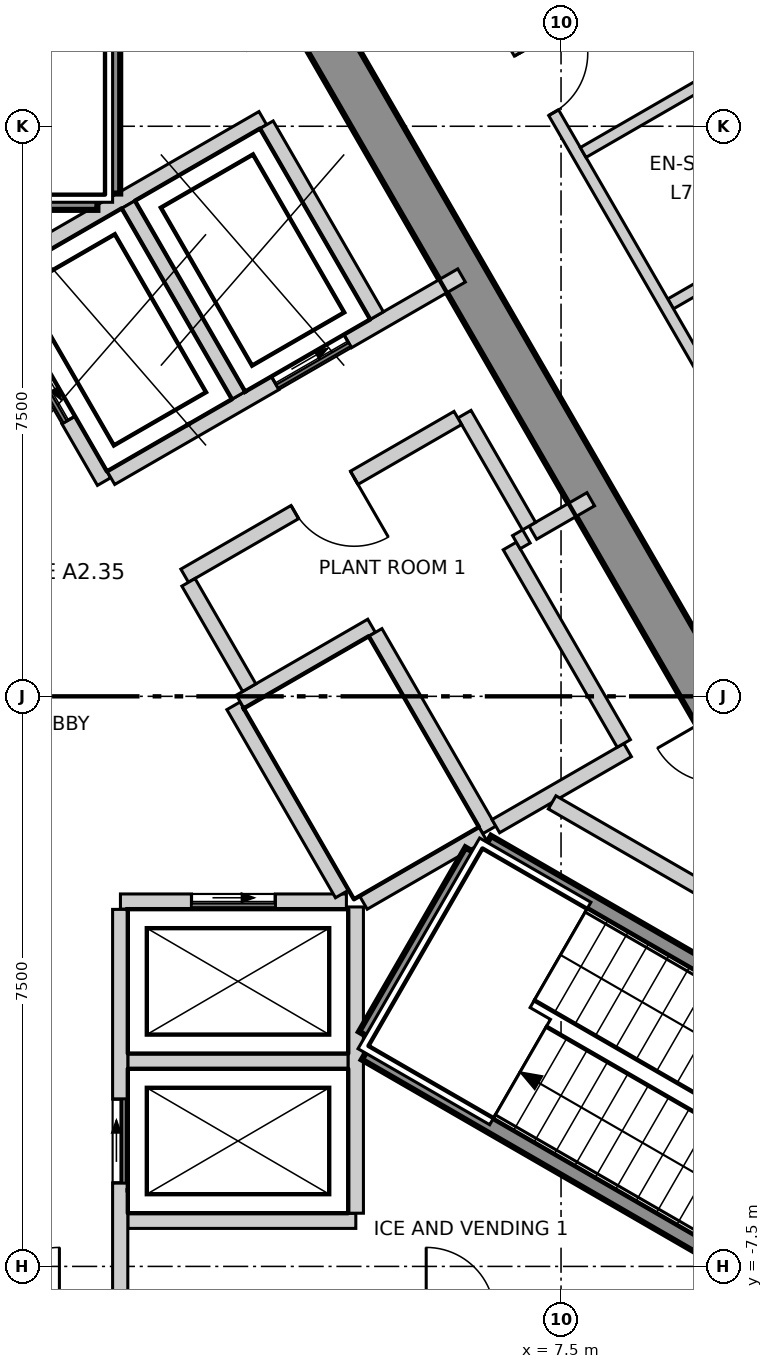
"""IFC4 building model, lengths in metres.
Left out: names, types, materials, properties, quantities, classifications, styles, units other than length and angle.
Written with IfcOpenShell. Run it as: python <this file> out.ifc"""

import sys

from ifc_helpers import new_model, si_unit, direction, frame, frame_2d, origin, place, context, subcontext, project, spatial, polyline, rectangle, outline, extrude, element, fill, save


model = new_model("IFC4")
c1 = context("Model", 3, precision=1e-05, world=origin(), true_north=direction((0.0, 1.0)))
c2 = subcontext(c1, "Body", "Model", "MODEL_VIEW")
j1 = project(units=[si_unit("LENGTHUNIT", "METRE"), si_unit("PLANEANGLEUNIT", "RADIAN")], contexts=[c1])
p1 = place(None, origin())
s1 = spatial("IfcSite", under=j1, at=p1, CompositionType="ELEMENT")
p2 = place(p1, origin())
s2 = spatial("IfcBuilding", under=s1, at=p2, CompositionType="ELEMENT")
p3 = place(p2, frame((0.0, 0.0, 300.7)))
s3 = spatial("IfcBuildingStorey", under=s2, at=p3, CompositionType="ELEMENT", Elevation=300.7)
p4 = place(p3, frame((12.384, -5.15, -0.3), z_axis=(0.0, 0.0, 1.0), x_axis=(-0.500000539815, 0.866025092122, 0.0)))
e1 = element("IfcWall", 1, at=p4, inside=s3, PredefinedType="SHEAR", context=c2, shape_type="SweptSolid", body=[
    extrude(outline(polyline([(-0.173, -0.301), (1.795, -0.301), (3.763, -0.301), (5.731, -0.301), (7.7, -0.301), (9.668, -0.301), (11.636, -0.301), (13.604, -0.3), (15.573, -0.3), (17.541, -0.3), (19.509, -0.3), (21.477, -0.3), (21.131, 0.3), (19.226, 0.3), (17.321, 0.3), (15.415, 0.3), (13.51, 0.3), (11.605, 0.3), (9.699, 0.3), (7.794, 0.3), (5.889, 0.3), (3.984, 0.3), (2.078, 0.3), (0.173, 0.3), (-0.173, -0.301)])), origin(), (0.0, 0.0, 1.0), 3.6),
])
p5 = place(p4, frame((16.328, 0.0, 0.3)))
e2 = element("IfcOpeningElement", 2, at=p5, cuts=e1, PredefinedType="OPENING", context=c2, shape_type="SweptSolid", body=[
    extrude(rectangle(XDim=1.0, YDim=2.1, at=frame_2d((0.5, 1.05))), frame((0.0, 0.31, 0.0), z_axis=(0.0, -1.0, 0.0), x_axis=(1.0, 0.0, 0.0)), (0.0, 0.0, 1.0), 0.621),
])
p6 = place(p4, frame((4.777, 0.0, 0.3)))
e3 = element("IfcOpeningElement", 3, at=p6, cuts=e1, PredefinedType="OPENING", context=c2, shape_type="SweptSolid", body=[
    extrude(rectangle(XDim=0.9, YDim=2.1, at=frame_2d((0.45, 1.05))), frame((0.0, 0.31, 0.0), z_axis=(0.0, -1.0, 0.0), x_axis=(1.0, 0.0, 0.0)), (0.0, 0.0, 1.0), 0.621),
])
p7 = place(p3, frame((24.96, -11.578, 0.0), z_axis=(0.0, 0.0, 1.0), x_axis=(-0.500002391419, 0.866024023094, 0.0)))
e4 = element("IfcWall", 4, at=p7, inside=s3, PredefinedType="ELEMENTEDWALL", context=c2, shape_type="SweptSolid", body=[
    extrude(rectangle(XDim=44.994, YDim=0.2, at=frame_2d((22.497, 0.0))), origin(), (0.0, 0.0, 1.0), 3.3),
])
p8 = place(p7, frame((2.103, 0.0, 0.9)))
e5 = element("IfcOpeningElement", 5, at=p8, cuts=e4, PredefinedType="OPENING", context=c2, shape_type="SweptSolid", body=[
    extrude(rectangle(XDim=3.7, YDim=2.2, at=frame_2d((1.85, 1.1))), frame((0.0, 0.11, 0.0), z_axis=(0.0, -1.0, 0.0), x_axis=(1.0, 0.0, 0.0)), (0.0, 0.0, 1.0), 0.22),
])
p9 = place(p7, frame((7.404, 0.0, 0.9)))
e6 = element("IfcOpeningElement", 6, at=p9, cuts=e4, PredefinedType="OPENING", context=c2, shape_type="SweptSolid", body=[
    extrude(rectangle(XDim=3.7, YDim=2.2, at=frame_2d((1.85, 1.1))), frame((0.0, 0.11, 0.0), z_axis=(0.0, -1.0, 0.0), x_axis=(1.0, 0.0, 0.0)), (0.0, 0.0, 1.0), 0.22),
])
p10 = place(p7, frame((12.705, 0.0, 0.9)))
e7 = element("IfcOpeningElement", 7, at=p10, cuts=e4, PredefinedType="OPENING", context=c2, shape_type="SweptSolid", body=[
    extrude(rectangle(XDim=3.7, YDim=2.2, at=frame_2d((1.85, 1.1))), frame((0.0, 0.11, 0.0), z_axis=(0.0, -1.0, 0.0), x_axis=(1.0, 0.0, 0.0)), (0.0, 0.0, 1.0), 0.22),
])
p11 = place(p7, frame((18.006, 0.0, 0.9)))
e8 = element("IfcOpeningElement", 8, at=p11, cuts=e4, PredefinedType="OPENING", context=c2, shape_type="SweptSolid", body=[
    extrude(rectangle(XDim=3.7, YDim=2.2, at=frame_2d((1.85, 1.1))), frame((0.0, 0.11, 0.0), z_axis=(0.0, -1.0, 0.0), x_axis=(1.0, 0.0, 0.0)), (0.0, 0.0, 1.0), 0.22),
])
p12 = place(p7, frame((23.308, 0.0, 0.9)))
e9 = element("IfcOpeningElement", 9, at=p12, cuts=e4, PredefinedType="OPENING", context=c2, shape_type="SweptSolid", body=[
    extrude(rectangle(XDim=3.7, YDim=2.2, at=frame_2d((1.85, 1.1))), frame((0.0, 0.11, 0.0), z_axis=(0.0, -1.0, 0.0), x_axis=(1.0, 0.0, 0.0)), (0.0, 0.0, 1.0), 0.22),
])
p13 = place(p7, frame((28.609, 0.0, 0.9)))
e10 = element("IfcOpeningElement", 10, at=p13, cuts=e4, PredefinedType="OPENING", context=c2, shape_type="SweptSolid", body=[
    extrude(rectangle(XDim=3.7, YDim=2.2, at=frame_2d((1.85, 1.1))), frame((0.0, 0.11, 0.0), z_axis=(0.0, -1.0, 0.0), x_axis=(1.0, 0.0, 0.0)), (0.0, 0.0, 1.0), 0.22),
])
p14 = place(p7, frame((33.91, 0.0, 0.9)))
e11 = element("IfcOpeningElement", 11, at=p14, cuts=e4, PredefinedType="OPENING", context=c2, shape_type="SweptSolid", body=[
    extrude(rectangle(XDim=3.7, YDim=2.2, at=frame_2d((1.85, 1.1))), frame((0.0, 0.11, 0.0), z_axis=(0.0, -1.0, 0.0), x_axis=(1.0, 0.0, 0.0)), (0.0, 0.0, 1.0), 0.22),
])
p15 = place(p7, frame((39.211, 0.0, 0.9)))
e12 = element("IfcOpeningElement", 12, at=p15, cuts=e4, PredefinedType="OPENING", context=c2, shape_type="SweptSolid", body=[
    extrude(rectangle(XDim=3.7, YDim=2.2, at=frame_2d((1.85, 1.1))), frame((0.0, 0.11, 0.0), z_axis=(0.0, -1.0, 0.0), x_axis=(1.0, 0.0, 0.0)), (0.0, 0.0, 1.0), 0.22),
])
p16 = place(p3, frame((8.942, 5.163, 0.0), z_axis=(0.0, 0.0, 1.0), x_axis=(0.866006352826, 0.500032995777, 0.0)))
e13 = element("IfcWall", 13, at=p16, inside=s3, PredefinedType="PARTITIONING", context=c2, shape_type="SweptSolid", body=[
    extrude(rectangle(XDim=5.422, YDim=0.15, at=frame_2d((2.711, 0.0))), origin(), (0.0, 0.0, 1.0), 2.8),
])
p17 = place(p3, frame((0.075, 20.37, 0.0), z_axis=(0.0, 0.0, 1.0), x_axis=(0.500009775255, -0.866019759965, 0.0)))
e14 = element("IfcWall", 14, at=p17, inside=s3, PredefinedType="PARTITIONING", context=c2, shape_type="SweptSolid", body=[
    extrude(rectangle(XDim=35.207, YDim=0.15, at=frame_2d((17.604, 0.0))), origin(), (0.0, 0.0, 1.0), 3.3),
])
p18 = place(p17, frame((31.307, 0.0, 0.0)))
e15 = element("IfcOpeningElement", 15, at=p18, cuts=e14, PredefinedType="OPENING", context=c2, shape_type="SweptSolid", body=[
    extrude(rectangle(XDim=1.0, YDim=2.1, at=frame_2d((0.5, 1.05))), frame((0.0, 0.085, 0.0), z_axis=(0.0, -1.0, 0.0), x_axis=(1.0, 0.0, 0.0)), (0.0, 0.0, 1.0), 0.17),
])
p19 = place(p17, frame((20.355, 0.0, 0.0)))
e16 = element("IfcOpeningElement", 16, at=p19, cuts=e14, PredefinedType="OPENING", context=c2, shape_type="SweptSolid", body=[
    extrude(rectangle(XDim=1.0, YDim=2.1, at=frame_2d((0.5, 1.05))), frame((0.0, 0.085, 0.0), z_axis=(0.0, -1.0, 0.0), x_axis=(1.0, 0.0, 0.0)), (0.0, 0.0, 1.0), 0.17),
])
p20 = place(p17, frame((24.355, 0.0, 0.0)))
e17 = element("IfcOpeningElement", 17, at=p20, cuts=e14, PredefinedType="OPENING", context=c2, shape_type="SweptSolid", body=[
    extrude(rectangle(XDim=0.9, YDim=2.1, at=frame_2d((0.45, 1.05))), frame((0.0, 0.085, 0.0), z_axis=(0.0, -1.0, 0.0), x_axis=(1.0, 0.0, 0.0)), (0.0, 0.0, 1.0), 0.17),
])
p21 = place(p17, frame((22.255, 0.0, 0.0)))
e18 = element("IfcOpeningElement", 18, at=p21, cuts=e14, PredefinedType="OPENING", context=c2, shape_type="SweptSolid", body=[
    extrude(rectangle(XDim=0.9, YDim=2.1, at=frame_2d((0.45, 1.05))), frame((0.0, 0.085, 0.0), z_axis=(0.0, -1.0, 0.0), x_axis=(1.0, 0.0, 0.0)), (0.0, 0.0, 1.0), 0.17),
])
p22 = place(p17, frame((8.453, 0.0, 0.0)))
e19 = element("IfcOpeningElement", 19, at=p22, cuts=e14, PredefinedType="OPENING", context=c2, shape_type="SweptSolid", body=[
    extrude(rectangle(XDim=1.0, YDim=2.1, at=frame_2d((0.5, 1.05))), frame((0.0, 0.085, 0.0), z_axis=(0.0, -1.0, 0.0), x_axis=(1.0, 0.0, 0.0)), (0.0, 0.0, 1.0), 0.17),
])
p23 = place(p17, frame((13.753, 0.0, 0.0)))
e20 = element("IfcOpeningElement", 20, at=p23, cuts=e14, PredefinedType="OPENING", context=c2, shape_type="SweptSolid", body=[
    extrude(rectangle(XDim=0.9, YDim=2.1, at=frame_2d((0.45, 1.05))), frame((0.0, 0.085, 0.0), z_axis=(0.0, -1.0, 0.0), x_axis=(1.0, 0.0, 0.0)), (0.0, 0.0, 1.0), 0.17),
])
p24 = place(p17, frame((11.553, 0.0, 0.0)))
e21 = element("IfcOpeningElement", 21, at=p24, cuts=e14, PredefinedType="OPENING", context=c2, shape_type="SweptSolid", body=[
    extrude(rectangle(XDim=0.9, YDim=2.1, at=frame_2d((0.45, 1.05))), frame((0.0, 0.085, 0.0), z_axis=(0.0, -1.0, 0.0), x_axis=(1.0, 0.0, 0.0)), (0.0, 0.0, 1.0), 0.17),
])
p25 = place(p17, frame((2.951, 0.0, 0.0)))
e22 = element("IfcOpeningElement", 22, at=p25, cuts=e14, PredefinedType="OPENING", context=c2, shape_type="SweptSolid", body=[
    extrude(rectangle(XDim=1.0, YDim=2.1, at=frame_2d((0.5, 1.05))), frame((0.0, 0.085, 0.0), z_axis=(0.0, -1.0, 0.0), x_axis=(1.0, 0.0, 0.0)), (0.0, 0.0, 1.0), 0.17),
])
p26 = place(p3, frame((7.791, 7.155, 0.0), z_axis=(0.0, 0.0, 1.0), x_axis=(0.866042279195, 0.499970769793, 0.0)))
e23 = element("IfcWall", 23, at=p26, inside=s3, PredefinedType="PARTITIONING", context=c2, shape_type="SweptSolid", body=[
    extrude(rectangle(XDim=2.638, YDim=0.15, at=frame_2d((1.319, 0.0))), origin(), (0.0, 0.0, 1.0), 3.3),
])
p27 = place(p3, frame((1.8, -4.8, 0.0), z_axis=(0.0, 0.0, 1.0), x_axis=(1.0, 0.0, 0.0)))
e24 = element("IfcWall", 24, at=p27, inside=s3, PredefinedType="SOLIDWALL", context=c2, shape_type="SweptSolid", body=[
    extrude(rectangle(XDim=2.9, YDim=0.2, at=frame_2d((1.45, 0.0))), origin(), (0.0, 0.0, 1.0), 3.3),
])
p28 = place(p3, frame((1.8, -6.9, 0.0), z_axis=(0.0, 0.0, 1.0), x_axis=(1.0, 0.0, 0.0)))
e25 = element("IfcWall", 25, at=p28, inside=s3, PredefinedType="SOLIDWALL", context=c2, shape_type="SweptSolid", body=[
    extrude(rectangle(XDim=3.0, YDim=0.2, at=frame_2d((1.5, 0.0))), origin(), (0.0, 0.0, 1.0), 3.3),
])
p29 = place(p3, frame((1.703, -2.7, 0.0), z_axis=(0.0, 0.0, 1.0), x_axis=(1.0, 0.0, 0.0)))
e26 = element("IfcWall", 26, at=p29, inside=s3, PredefinedType="SOLIDWALL", context=c2, shape_type="SweptSolid", body=[
    extrude(rectangle(XDim=2.973, YDim=0.2, at=frame_2d((1.487, 0.0))), origin(), (0.0, 0.0, 1.0), 3.3),
])
p30 = place(p29, frame((0.936, 0.0, 0.0)))
e27 = element("IfcOpeningElement", 27, at=p30, cuts=e26, PredefinedType="OPENING", context=c2, shape_type="SweptSolid", body=[
    extrude(rectangle(XDim=1.1, YDim=2.1, at=frame_2d((0.55, 1.05))), frame((0.0, 0.11, 0.0), z_axis=(0.0, -1.0, 0.0), x_axis=(1.0, 0.0, 0.0)), (0.0, 0.0, 1.0), 0.22),
])
p31 = place(p3, frame((-0.002, 5.541, 0.0), z_axis=(0.0, 0.0, 1.0), x_axis=(0.86600155993, 0.500041296494, 0.0)))
e28 = element("IfcWall", 28, at=p31, inside=s3, PredefinedType="SOLIDWALL", context=c2, shape_type="SweptSolid", body=[
    extrude(rectangle(XDim=4.132, YDim=0.2, at=frame_2d((2.066, 0.0))), origin(), (0.0, 0.0, 1.0), 3.3),
])
p32 = place(p3, frame((0.0, 5.4, 0.0), z_axis=(0.0, 0.0, 1.0), x_axis=(0.500103862429, -0.865965430478, 0.0)))
e29 = element("IfcWall", 29, at=p32, inside=s3, PredefinedType="SOLIDWALL", context=c2, shape_type="SweptSolid", body=[
    extrude(rectangle(XDim=2.973, YDim=0.2, at=frame_2d((1.487, 0.0))), origin(), (0.0, 0.0, 1.0), 3.3),
])
p33 = place(p32, frame((0.937, 0.0, 0.0)))
e30 = element("IfcOpeningElement", 30, at=p33, cuts=e29, PredefinedType="OPENING", context=c2, shape_type="SweptSolid", body=[
    extrude(rectangle(XDim=1.1, YDim=2.1, at=frame_2d((0.55, 1.05))), frame((0.0, 0.11, 0.0), z_axis=(0.0, -1.0, 0.0), x_axis=(1.0, 0.0, 0.0)), (0.0, 0.0, 1.0), 0.22),
])
p34 = place(p3, frame((3.19, -0.125, 0.0), z_axis=(0.0, 0.0, 1.0), x_axis=(0.499988658015, -0.866031951983, 0.0)))
e31 = element("IfcWall", 31, at=p34, inside=s3, PredefinedType="SOLIDWALL", context=c2, shape_type="SweptSolid", body=[
    extrude(rectangle(XDim=2.858, YDim=0.2, at=frame_2d((1.429, 0.0))), origin(), (0.0, 0.0, 1.0), 3.3),
])
p35 = place(p3, frame((1.578, 2.874, 0.0), z_axis=(0.0, 0.0, 1.0), x_axis=(0.866045911672, 0.499964477614, 0.0)))
e32 = element("IfcWall", 32, at=p35, inside=s3, PredefinedType="SOLIDWALL", context=c2, shape_type="SweptSolid", body=[
    extrude(rectangle(XDim=5.327, YDim=0.2, at=frame_2d((2.663, 0.0))), origin(), (0.0, 0.0, 1.0), 3.3),
])
p36 = place(p35, frame((2.496, 0.0, 0.0)))
e33 = element("IfcOpeningElement", 33, at=p36, cuts=e32, PredefinedType="OPENING", context=c2, shape_type="SweptSolid", body=[
    extrude(rectangle(XDim=1.1, YDim=2.1, at=frame_2d((0.55, 1.05))), frame((0.0, 0.11, 0.0), z_axis=(0.0, -1.0, 0.0), x_axis=(1.0, 0.0, 0.0)), (0.0, 0.0, 1.0), 0.22),
])
p37 = place(p3, frame((1.7, -8.13, 0.0), z_axis=(0.0, 0.0, 1.0), x_axis=(0.0, 1.0, 0.0)))
e34 = element("IfcWall", 34, at=p37, inside=s3, PredefinedType="SOLIDWALL", context=c2, shape_type="SweptSolid", body=[
    extrude(rectangle(XDim=5.327, YDim=0.2, at=frame_2d((2.664, 0.0))), origin(), (0.0, 0.0, 1.0), 3.3),
])
p38 = place(p37, frame((1.73, 0.0, 0.0)))
e35 = element("IfcOpeningElement", 35, at=p38, cuts=e34, PredefinedType="OPENING", context=c2, shape_type="SweptSolid", body=[
    extrude(rectangle(XDim=1.1, YDim=2.1, at=frame_2d((0.55, 1.05))), frame((0.0, 0.11, 0.0), z_axis=(0.0, -1.0, 0.0), x_axis=(1.0, 0.0, 0.0)), (0.0, 0.0, 1.0), 0.22),
])
p39 = place(p3, frame((4.8, -6.8, 0.0), z_axis=(0.0, 0.0, 1.0), x_axis=(0.0, 1.0, 0.0)))
e36 = element("IfcWall", 36, at=p39, inside=s3, PredefinedType="SOLIDWALL", context=c2, shape_type="SweptSolid", body=[
    extrude(rectangle(XDim=4.029, YDim=0.2, at=frame_2d((2.015, 0.0))), origin(), (0.0, 0.0, 1.0), 3.3),
])
p40 = place(p3, frame((3.278, -0.071, 0.0), z_axis=(0.0, 0.0, 1.0), x_axis=(0.865855657918, 0.500293893279, 0.0)))
e37 = element("IfcWall", 37, at=p40, inside=s3, PredefinedType="SOLIDWALL", context=c2, shape_type="SweptSolid", body=[
    extrude(rectangle(XDim=1.997, YDim=0.2, at=frame_2d((0.999, 0.0))), origin(), (0.0, 0.0, 1.0), 3.3),
])
p41 = place(p3, frame((7.129, 2.153, 0.0), z_axis=(0.0, 0.0, 1.0), x_axis=(0.866083962871, 0.499898558967, 0.0)))
e38 = element("IfcWall", 38, at=p41, inside=s3, PredefinedType="SOLIDWALL", context=c2, shape_type="SweptSolid", body=[
    extrude(rectangle(XDim=0.88, YDim=0.2, at=frame_2d((0.44, 0.0))), origin(), (0.0, 0.0, 1.0), 3.3),
])
for number, where, z_axis, x_axis in (
    (39, (3.626, 7.52, 0.0), (0.0, 0.0, 1.0), (0.5, -0.866, 0.0)),
    (40, (1.807, 6.47, 0.0), (0.0, 0.0, 1.0), (0.5, -0.866, 0.0)),
):
    element("IfcWall", number, at=place(p3, frame(where, z_axis=z_axis, x_axis=x_axis)), inside=s3, PredefinedType="SOLIDWALL", context=c2, shape_type="SweptSolid", body=[
        extrude(rectangle(XDim=2.9, YDim=0.2, at=frame_2d((1.45, 0.0))), origin(), (0.0, 0.0, 1.0), 3.3),
    ])
p42 = place(p3, frame((5.057, 0.841, 0.0), z_axis=(0.0, 0.0, 1.0), x_axis=(0.499990139034, -0.866031096941, 0.0)))
e41 = element("IfcWall", 41, at=p42, inside=s3, PredefinedType="SOLIDWALL", context=c2, shape_type="SweptSolid", body=[
    extrude(rectangle(XDim=3.0, YDim=0.2, at=frame_2d((1.5, 0.0))), origin(), (0.0, 0.0, 1.0), 3.3),
])
p43 = place(p3, frame((4.9, -2.714, 0.0), z_axis=(0.0, 0.0, 1.0), x_axis=(0.865846928409, 0.500309001083, 0.0)))
e42 = element("IfcWall", 42, at=p43, inside=s3, PredefinedType="SOLIDWALL", context=c2, shape_type="SweptSolid", body=[
    extrude(rectangle(XDim=1.813, YDim=0.2, at=frame_2d((0.907, 0.0))), origin(), (0.0, 0.0, 1.0), 3.3),
])
p44 = place(p3, frame((6.229, 3.712, 0.0), z_axis=(0.0, 0.0, 1.0), x_axis=(0.499875724984, -0.86609714211, 0.0)))
e43 = element("IfcWall", 43, at=p44, inside=s3, PredefinedType="SOLIDWALL", context=c2, shape_type="SweptSolid", body=[
    extrude(rectangle(XDim=1.701, YDim=0.2, at=frame_2d((0.85, 0.0))), origin(), (0.0, 0.0, 1.0), 3.3),
])
p45 = place(p3, frame((2.548, 1.587, 0.0), z_axis=(0.0, 0.0, 1.0), x_axis=(0.866004344652, 0.500036473714, 0.0)))
e44 = element("IfcWall", 44, at=p45, inside=s3, PredefinedType="SOLIDWALL", context=c2, shape_type="SweptSolid", body=[
    extrude(rectangle(XDim=4.15, YDim=0.2, at=frame_2d((2.075, 0.0))), origin(), (0.0, 0.0, 1.0), 3.3),
])
p46 = place(p45, frame((1.675, 0.0, 0.0)))
e45 = element("IfcOpeningElement", 45, at=p46, cuts=e44, PredefinedType="OPENING", context=c2, shape_type="SweptSolid", body=[
    extrude(rectangle(XDim=0.9, YDim=2.1, at=frame_2d((0.45, 1.05))), frame((0.0, 0.11, 0.0), z_axis=(0.0, -1.0, 0.0), x_axis=(1.0, 0.0, 0.0)), (0.0, 0.0, 1.0), 0.22),
])
p47 = place(p3, frame((2.598, 1.5, 0.0), z_axis=(0.0, 0.0, 1.0), x_axis=(0.499929347863, -0.866066190972, 0.0)))
e46 = element("IfcWall", 46, at=p47, inside=s3, PredefinedType="SOLIDWALL", context=c2, shape_type="SweptSolid", body=[
    extrude(rectangle(XDim=1.6, YDim=0.2, at=frame_2d((0.8, 0.0))), origin(), (0.0, 0.0, 1.0), 3.3),
])
p48 = place(p3, frame((6.642, -1.708, 0.0), z_axis=(0.0, 0.0, 1.0), x_axis=(0.866043441391, 0.499968756647, 0.0)))
e47 = element("IfcWall", 47, at=p48, inside=s3, PredefinedType="SOLIDWALL", context=c2, shape_type="SweptSolid", body=[
    extrude(rectangle(XDim=2.002, YDim=0.2, at=frame_2d((1.001, 0.0))), origin(), (0.0, 0.0, 1.0), 3.3),
])
p49 = place(p3, frame((6.826, 1.978, 0.0), z_axis=(0.0, 0.0, 1.0), x_axis=(0.499990139034, -0.866031096941, 0.0)))
e48 = element("IfcWall", 48, at=p49, inside=s3, PredefinedType="SOLIDWALL", context=c2, shape_type="SweptSolid", body=[
    extrude(rectangle(XDim=3.0, YDim=0.2, at=frame_2d((1.5, 0.0))), origin(), (0.0, 0.0, 1.0), 3.3),
])
p50 = place(p3, frame((6.912, 2.028, 0.0), z_axis=(0.0, 0.0, 1.0), x_axis=(0.866559367082, 0.499074005857, 0.0)))
e49 = element("IfcWall", 49, at=p50, inside=s3, PredefinedType="SOLIDWALL", context=c2, shape_type="SweptSolid", body=[
    extrude(rectangle(XDim=0.152, YDim=0.2, at=frame_2d((0.076, 0.0))), origin(), (0.0, 0.0, 1.0), 3.3),
])
p51 = place(p3, frame((7.383, -1.395, 0.0), z_axis=(0.0, 0.0, 1.0), x_axis=(0.865968383994, -0.500098748171, 0.0)))
e50 = element("IfcWall", 50, at=p51, inside=s3, PredefinedType="SOLIDWALL", context=c2, shape_type="SweptSolid", body=[
    extrude(rectangle(XDim=4.867, YDim=0.2, at=frame_2d((2.434, 0.0))), origin(), (0.0, 0.0, 1.0), 3.3),
])
p52 = place(p3, frame((1.6, 6.615, 0.0), z_axis=(0.0, 0.0, 1.0), x_axis=(0.0, 1.0, 0.0)))
e51 = element("IfcWall", 51, at=p52, inside=s3, PredefinedType="SOLIDWALL", context=c2, shape_type="SweptSolid", body=[
    extrude(rectangle(XDim=6.665, YDim=0.2, at=frame_2d((3.333, 0.0))), origin(), (0.0, 0.0, 1.0), 3.3),
])
p53 = place(p3, frame((-1.4, 6.5, 0.0), z_axis=(0.0, 0.0, 1.0), x_axis=(1.0, 0.0, 0.0)))
e52 = element("IfcWall", 52, at=p53, inside=s3, PredefinedType="SOLIDWALL", context=c2, shape_type="SweptSolid", body=[
    extrude(rectangle(XDim=2.8, YDim=0.2, at=frame_2d((1.4, 0.0))), origin(), (0.0, 0.0, 1.0), 3.3),
])
p54 = place(p3, frame((4.929, -4.693, 0.0), z_axis=(0.0, 0.0, 1.0), x_axis=(0.866005022404, -0.500035299925, 0.0)))
e53 = element("IfcWall", 53, at=p54, inside=s3, PredefinedType="SOLIDWALL", context=c2, shape_type="SweptSolid", body=[
    extrude(rectangle(XDim=6.665, YDim=0.2, at=frame_2d((3.333, 0.0))), origin(), (0.0, 0.0, 1.0), 3.3),
])
p55 = place(p3, frame((4.929, -4.462, 0.0), z_axis=(0.0, 0.0, 1.0), x_axis=(0.500200581029, 0.865909567298, 0.0)))
e54 = element("IfcWall", 54, at=p55, inside=s3, PredefinedType="SOLIDWALL", context=c2, shape_type="SweptSolid", body=[
    extrude(rectangle(XDim=2.799, YDim=0.2, at=frame_2d((1.399, 0.0))), origin(), (0.0, 0.0, 1.0), 3.3),
])
p56 = place(p3, frame((6.529, -1.922, 0.0), z_axis=(0.0, 0.0, 1.0), x_axis=(0.866068467981, -0.499925403204, 0.0)))
e55 = element("IfcWall", 55, at=p56, inside=s3, PredefinedType="SOLIDWALL", context=c2, shape_type="SweptSolid", body=[
    extrude(rectangle(XDim=6.665, YDim=0.2, at=frame_2d((3.332, 0.0))), origin(), (0.0, 0.0, 1.0), 3.3),
])
p57 = place(p30, origin())
e56 = element("IfcDoor", 56, at=p57, inside=s3, OperationType="SLIDING_TO_LEFT", PredefinedType="DOOR", context=c2, shape_type="SweptSolid", body=[
    extrude(rectangle(XDim=1.1, YDim=2.1, at=frame_2d((0.55, 1.05))), frame((0.0, 0.025, 0.0), z_axis=(0.0, -1.0, 0.0), x_axis=(1.0, 0.0, 0.0)), (0.0, 0.0, 1.0), 0.05),
])
fill(e27, e56)
p58 = place(p38, origin())
e57 = element("IfcDoor", 57, at=p58, inside=s3, OperationType="SLIDING_TO_LEFT", PredefinedType="DOOR", context=c2, shape_type="SweptSolid", body=[
    extrude(rectangle(XDim=1.1, YDim=2.1, at=frame_2d((0.55, 1.05))), frame((0.0, 0.025, 0.0), z_axis=(0.0, -1.0, 0.0), x_axis=(1.0, 0.0, 0.0)), (0.0, 0.0, 1.0), 0.05),
])
fill(e35, e57)
p59 = place(p33, origin())
e58 = element("IfcDoor", 58, at=p59, inside=s3, OperationType="SLIDING_TO_LEFT", PredefinedType="DOOR", context=c2, shape_type="SweptSolid", body=[
    extrude(rectangle(XDim=1.1, YDim=2.1, at=frame_2d((0.55, 1.05))), frame((0.0, 0.025, 0.0), z_axis=(0.0, -1.0, 0.0), x_axis=(1.0, 0.0, 0.0)), (0.0, 0.0, 1.0), 0.05),
])
fill(e30, e58)
p60 = place(p36, origin())
e59 = element("IfcDoor", 59, at=p60, inside=s3, OperationType="SLIDING_TO_LEFT", PredefinedType="DOOR", context=c2, shape_type="SweptSolid", body=[
    extrude(rectangle(XDim=1.1, YDim=2.1, at=frame_2d((0.55, 1.05))), frame((0.0, 0.025, 0.0), z_axis=(0.0, -1.0, 0.0), x_axis=(1.0, 0.0, 0.0)), (0.0, 0.0, 1.0), 0.05),
])
fill(e33, e59)
p61 = place(p23, origin())
e60 = element("IfcDoor", 60, at=p61, inside=s3, OperationType="SINGLE_SWING_RIGHT", PredefinedType="DOOR", context=c2, shape_type="SweptSolid", body=[
    extrude(rectangle(XDim=0.9, YDim=2.1, at=frame_2d((0.45, 1.05))), frame((0.0, 0.025, 0.0), z_axis=(0.0, -1.0, 0.0), x_axis=(1.0, 0.0, 0.0)), (0.0, 0.0, 1.0), 0.05),
])
fill(e20, e60)
p62 = place(p46, origin())
e61 = element("IfcDoor", 61, at=p62, inside=s3, OperationType="SINGLE_SWING_RIGHT", PredefinedType="DOOR", context=c2, shape_type="SweptSolid", body=[
    extrude(rectangle(XDim=0.9, YDim=2.1, at=frame_2d((0.45, 1.05))), frame((0.0, 0.025, 0.0), z_axis=(0.0, -1.0, 0.0), x_axis=(1.0, 0.0, 0.0)), (0.0, 0.0, 1.0), 0.05),
])
fill(e45, e61)
save(model, sys.argv[1])
